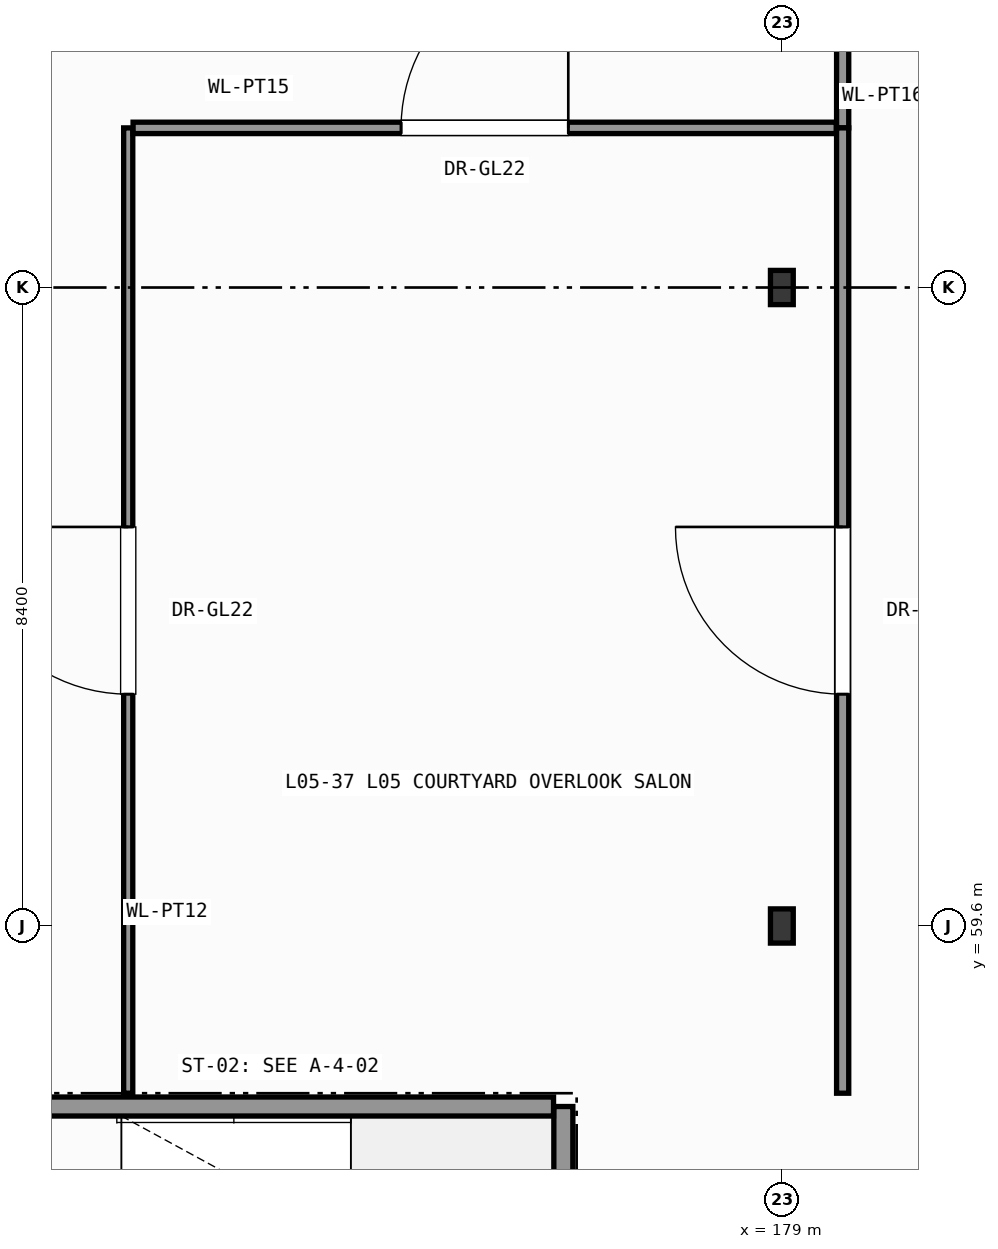
"""IFC4 building model, lengths in metres.
Left out: names, types, materials, properties, quantities, classifications, styles, units other than length and angle.
Written with IfcOpenShell. Run it as: python <this file> out.ifc"""

import sys

from ifc_helpers import new_model, si_unit, direction, frame, frame_2d, origin, origin_2d, place, context, subcontext, project, spatial, rectangle, i_section, extrude, element, fill, save


model = new_model("IFC4")
c1 = context("Model", 3, precision=1e-05, world=origin(), true_north=direction((0.0, 1.0)))
c2 = subcontext(c1, "Body", "Model", "MODEL_VIEW")
j1 = project(units=[si_unit("LENGTHUNIT", "METRE"), si_unit("PLANEANGLEUNIT", "RADIAN")], contexts=[c1])
p1 = place(None, origin())
s1 = spatial("IfcSite", under=j1, at=p1, CompositionType="ELEMENT")
p2 = place(p1, origin())
s2 = spatial("IfcBuilding", under=s1, at=p2, CompositionType="ELEMENT")
p3 = place(p2, frame((0.0, 0.0, 22.2)))
s3 = spatial("IfcBuildingStorey", under=s2, at=p3, CompositionType="ELEMENT", Elevation=22.2)
for number, where, z_axis, x_axis in (
    (1, (179.0, 59.6, 0.0), (0.0, 0.0, 1.0), (1.0, 0.0, 0.0)),
    (2, (179.0, 68.0, 0.0), (0.0, 0.0, 1.0), (1.0, 0.0, 0.0)),
):
    element("IfcColumn", number, at=place(p3, frame(where, z_axis=z_axis, x_axis=x_axis)), inside=s3, PredefinedType="COLUMN", context=c2, shape_type="SweptSolid", body=[
        extrude(i_section(OverallWidth=0.3, OverallDepth=0.45, WebThickness=0.014, FlangeThickness=0.026, FilletRadius=0.027, at=origin_2d()), origin(), (0.0, 0.0, 1.0), 4.2),
    ])
p4 = place(p3, frame((176.125, 53.875, 0.0), z_axis=(0.0, 0.0, 1.0), x_axis=(0.0, 1.0, 0.0)))
e3 = element("IfcWall", 3, at=p4, inside=s3, PredefinedType="SHEAR", context=c2, shape_type="SweptSolid", body=[
    extrude(rectangle(XDim=3.35, YDim=0.25, at=frame_2d((1.675, 0.0))), origin(), (0.0, 0.0, 1.0), 3.98),
])
p5 = place(p3, frame((168.804, 57.225, 0.0), z_axis=(0.0, 0.0, 1.0), x_axis=(1.0, 0.0, 0.0)))
e4 = element("IfcWall", 4, at=p5, inside=s3, PredefinedType="SHEAR", context=c2, shape_type="SweptSolid", body=[
    extrude(rectangle(XDim=7.192, YDim=0.25, at=frame_2d((3.596, 0.0))), origin(), (0.0, 0.0, 1.0), 3.98),
])
p6 = place(p3, frame((170.4, 57.4, 0.0), z_axis=(0.0, 0.0, 1.0), x_axis=(0.0, 1.0, 0.0)))
e5 = element("IfcWall", 5, at=p6, inside=s3, PredefinedType="PARTITIONING", context=c2, shape_type="SweptSolid", body=[
    extrude(rectangle(XDim=12.7, YDim=0.12, at=frame_2d((6.35, 0.0))), origin(), (0.0, 0.0, 1.0), 3.98),
])
p7 = place(p6, frame((5.25, 0.0, 0.0)))
e6 = element("IfcOpeningElement", 6, at=p7, cuts=e5, PredefinedType="OPENING", context=c2, shape_type="SweptSolid", body=[
    extrude(rectangle(XDim=2.2, YDim=2.6, at=frame_2d((1.1, 1.3))), frame((0.0, 0.07, 0.0), z_axis=(0.0, -1.0, 0.0), x_axis=(1.0, 0.0, 0.0)), (0.0, 0.0, 1.0), 0.14),
])
p8 = place(p3, frame((179.8, 70.1, 0.0), z_axis=(0.0, 0.0, 1.0), x_axis=(0.0, 1.0, 0.0)))
e7 = element("IfcWall", 7, at=p8, inside=s3, PredefinedType="PARTITIONING", context=c2, shape_type="SweptSolid", body=[
    extrude(rectangle(XDim=3.4, YDim=0.16, at=frame_2d((1.7, 0.0))), origin(), (0.0, 0.0, 1.0), 3.98),
])
p9 = place(p8, frame((1.2, 0.0, 0.0)))
e8 = element("IfcOpeningElement", 8, at=p9, cuts=e7, PredefinedType="OPENING", context=c2, shape_type="SweptSolid", body=[
    extrude(rectangle(XDim=1.0, YDim=2.15, at=frame_2d((0.5, 1.075))), frame((0.0, 0.09, 0.0), z_axis=(0.0, -1.0, 0.0), x_axis=(1.0, 0.0, 0.0)), (0.0, 0.0, 1.0), 0.18),
])
p10 = place(p3, frame((170.464, 70.1, 0.0), z_axis=(0.0, 0.0, 1.0), x_axis=(1.0, 0.0, 0.0)))
e9 = element("IfcWall", 9, at=p10, inside=s3, PredefinedType="PARTITIONING", context=c2, shape_type="SweptSolid", body=[
    extrude(rectangle(XDim=9.252, YDim=0.15, at=frame_2d((4.626, 0.0))), origin(), (0.0, 0.0, 1.0), 3.98),
])
p11 = place(p10, frame((3.526, 0.0, 0.0)))
e10 = element("IfcOpeningElement", 10, at=p11, cuts=e9, PredefinedType="OPENING", context=c2, shape_type="SweptSolid", body=[
    extrude(rectangle(XDim=2.2, YDim=2.6, at=frame_2d((1.1, 1.3))), frame((0.0, 0.085, 0.0), z_axis=(0.0, -1.0, 0.0), x_axis=(1.0, 0.0, 0.0)), (0.0, 0.0, 1.0), 0.17),
])
p12 = place(p3, frame((179.8, 57.4, 0.0), z_axis=(0.0, 0.0, 1.0), x_axis=(0.0, 1.0, 0.0)))
e11 = element("IfcWall", 11, at=p12, inside=s3, PredefinedType="PARTITIONING", context=c2, shape_type="SweptSolid", body=[
    extrude(rectangle(XDim=12.7, YDim=0.16, at=frame_2d((6.35, 0.0))), origin(), (0.0, 0.0, 1.0), 3.98),
])
p13 = place(p12, frame((5.25, 0.0, 0.0)))
e12 = element("IfcOpeningElement", 12, at=p13, cuts=e11, PredefinedType="OPENING", context=c2, shape_type="SweptSolid", body=[
    extrude(rectangle(XDim=2.2, YDim=2.6, at=frame_2d((1.1, 1.3))), frame((0.0, 0.09, 0.0), z_axis=(0.0, -1.0, 0.0), x_axis=(1.0, 0.0, 0.0)), (0.0, 0.0, 1.0), 0.18),
])
p14 = place(p7, origin())
e13 = element("IfcDoor", 13, at=p14, inside=s3, OperationType="SINGLE_SWING_RIGHT", PredefinedType="DOOR", context=c2, shape_type="SweptSolid", body=[
    extrude(rectangle(XDim=2.2, YDim=2.6, at=frame_2d((1.1, 1.3))), frame((0.0, 0.025, 0.0), z_axis=(0.0, -1.0, 0.0), x_axis=(1.0, 0.0, 0.0)), (0.0, 0.0, 1.0), 0.05),
])
fill(e6, e13)
p15 = place(p11, origin())
e14 = element("IfcDoor", 14, at=p15, inside=s3, OperationType="SINGLE_SWING_RIGHT", PredefinedType="DOOR", context=c2, shape_type="SweptSolid", body=[
    extrude(rectangle(XDim=2.2, YDim=2.6, at=frame_2d((1.1, 1.3))), frame((0.0, 0.025, 0.0), z_axis=(0.0, -1.0, 0.0), x_axis=(1.0, 0.0, 0.0)), (0.0, 0.0, 1.0), 0.05),
])
fill(e10, e14)
p16 = place(p13, origin())
e15 = element("IfcDoor", 15, at=p16, inside=s3, OperationType="SINGLE_SWING_RIGHT", PredefinedType="DOOR", context=c2, shape_type="SweptSolid", body=[
    extrude(rectangle(XDim=2.2, YDim=2.6, at=frame_2d((1.1, 1.3))), frame((0.0, 0.025, 0.0), z_axis=(0.0, -1.0, 0.0), x_axis=(1.0, 0.0, 0.0)), (0.0, 0.0, 1.0), 0.05),
])
fill(e12, e15)
save(model, sys.argv[1])
